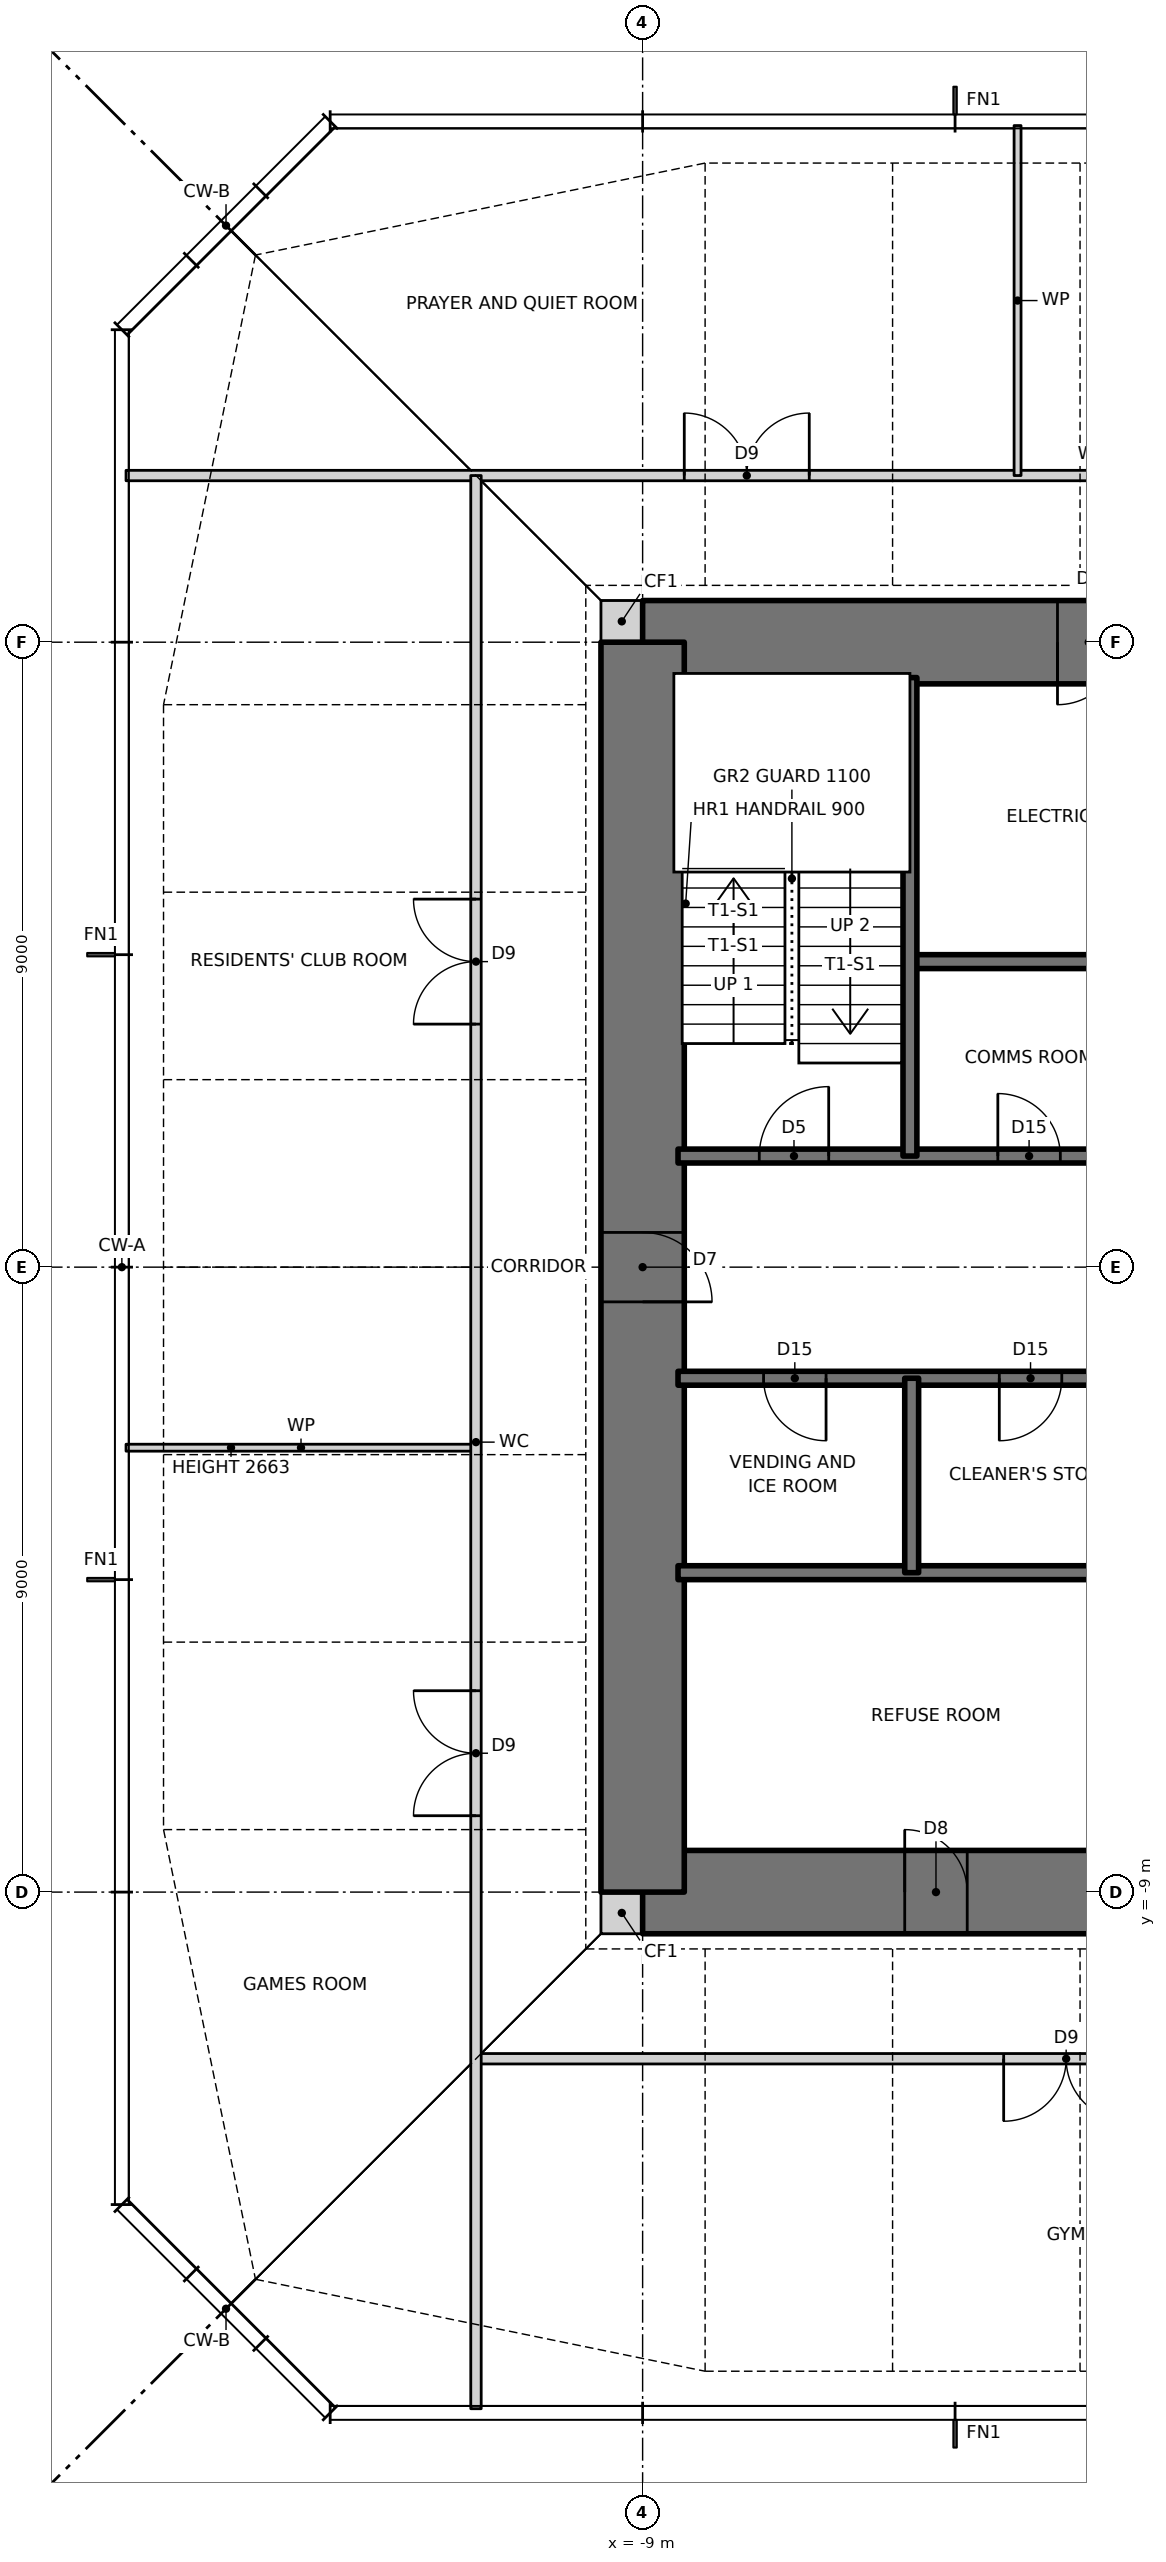
"""IFC4 building model, lengths in metres.
Left out: names, types, materials, properties, quantities, classifications, styles, units other than length and angle.
Written with IfcOpenShell. Run it as: python <this file> out.ifc"""

import sys

from ifc_helpers import new_model, si_unit, direction, frame, frame_2d, origin, place, context, subcontext, project, spatial, rectangle, extrude, element, fill, save


model = new_model("IFC4")
c1 = context("Model", 3, precision=1e-05, world=origin(), true_north=direction((0.0, 1.0)))
c2 = subcontext(c1, "Body", "Model", "MODEL_VIEW")
j1 = project(units=[si_unit("LENGTHUNIT", "METRE"), si_unit("PLANEANGLEUNIT", "RADIAN")], contexts=[c1])
p1 = place(None, origin())
s1 = spatial("IfcSite", under=j1, at=p1, CompositionType="ELEMENT")
p2 = place(p1, origin())
s2 = spatial("IfcBuilding", under=s1, at=p2, CompositionType="ELEMENT")
p3 = place(p2, frame((0.0, 0.0, 215.0)))
s3 = spatial("IfcBuildingStorey", under=s2, at=p3, CompositionType="ELEMENT", Elevation=215.0)
for number, where, z_axis, x_axis in (
    (1, (-9.6, -9.3, 0.0), (0.0, 0.0, 1.0), (1.0, 0.0, 0.0)),
    (2, (-9.6, 9.3, 0.0), (0.0, 0.0, 1.0), (1.0, 0.0, 0.0)),
):
    element("IfcWall", number, at=place(p3, frame(where, z_axis=z_axis, x_axis=x_axis)), inside=s3, PredefinedType="SOLIDWALL", context=c2, shape_type="SweptSolid", body=[
        extrude(rectangle(XDim=0.6, YDim=0.6, at=frame_2d((0.3, 0.0))), origin(), (0.0, 0.0, 1.0), 3.5),
    ])
p4 = place(p3, frame((-9.0, -9.0, 0.0), z_axis=(0.0, 0.0, 1.0), x_axis=(1.0, 0.0, 0.0)))
e3 = element("IfcWall", 3, at=p4, inside=s3, PredefinedType="SHEAR", context=c2, shape_type="SweptSolid", body=[
    extrude(rectangle(XDim=18.0, YDim=1.2, at=frame_2d((9.0, 0.0))), origin(), (0.0, 0.0, 1.0), 3.5),
])
p5 = place(p4, frame((3.775, 0.0, 0.0)))
e4 = element("IfcOpeningElement", 4, at=p5, cuts=e3, PredefinedType="OPENING", context=c2, shape_type="SweptSolid", body=[
    extrude(rectangle(XDim=0.9, YDim=2.1, at=frame_2d((0.45, 1.05))), frame((0.0, 0.61, 0.0), z_axis=(0.0, -1.0, 0.0), x_axis=(1.0, 0.0, 0.0)), (0.0, 0.0, 1.0), 1.22),
])
p6 = place(p4, frame((10.625, 0.0, 0.0)))
e5 = element("IfcOpeningElement", 5, at=p6, cuts=e3, PredefinedType="OPENING", context=c2, shape_type="SweptSolid", body=[
    extrude(rectangle(XDim=0.9, YDim=2.1, at=frame_2d((0.45, 1.05))), frame((0.0, 0.61, 0.0), z_axis=(0.0, -1.0, 0.0), x_axis=(1.0, 0.0, 0.0)), (0.0, 0.0, 1.0), 1.22),
])
p7 = place(p3, frame((9.0, 9.0, 0.0), z_axis=(0.0, 0.0, 1.0), x_axis=(-1.0, 0.0, 0.0)))
e6 = element("IfcWall", 6, at=p7, inside=s3, PredefinedType="SHEAR", context=c2, shape_type="SweptSolid", body=[
    extrude(rectangle(XDim=18.0, YDim=1.2, at=frame_2d((9.0, 0.0))), origin(), (0.0, 0.0, 1.0), 3.5),
])
p8 = place(p7, frame((11.125, 0.0, 0.0)))
e7 = element("IfcOpeningElement", 7, at=p8, cuts=e6, PredefinedType="OPENING", context=c2, shape_type="SweptSolid", body=[
    extrude(rectangle(XDim=0.9, YDim=2.1, at=frame_2d((0.45, 1.05))), frame((0.0, 0.61, 0.0), z_axis=(0.0, -1.0, 0.0), x_axis=(1.0, 0.0, 0.0)), (0.0, 0.0, 1.0), 1.22),
])
p9 = place(p7, frame((4.275, 0.0, 0.0)))
e8 = element("IfcOpeningElement", 8, at=p9, cuts=e6, PredefinedType="OPENING", context=c2, shape_type="SweptSolid", body=[
    extrude(rectangle(XDim=0.9, YDim=2.1, at=frame_2d((0.45, 1.05))), frame((0.0, 0.61, 0.0), z_axis=(0.0, -1.0, 0.0), x_axis=(1.0, 0.0, 0.0)), (0.0, 0.0, 1.0), 1.22),
])
p10 = place(p3, frame((-9.0, 9.0, 0.0), z_axis=(0.0, 0.0, 1.0), x_axis=(0.0, -1.0, 0.0)))
e9 = element("IfcWall", 9, at=p10, inside=s3, PredefinedType="SHEAR", context=c2, shape_type="SweptSolid", body=[
    extrude(rectangle(XDim=18.0, YDim=1.2, at=frame_2d((9.0, 0.0))), origin(), (0.0, 0.0, 1.0), 3.5),
])
p11 = place(p10, frame((8.5, 0.0, 0.0)))
e10 = element("IfcOpeningElement", 10, at=p11, cuts=e9, PredefinedType="OPENING", context=c2, shape_type="SweptSolid", body=[
    extrude(rectangle(XDim=1.0, YDim=2.1, at=frame_2d((0.5, 1.05))), frame((0.0, 0.61, 0.0), z_axis=(0.0, -1.0, 0.0), x_axis=(1.0, 0.0, 0.0)), (0.0, 0.0, 1.0), 1.22),
])
p12 = place(p3, frame((-11.4, -11.4, 0.0), z_axis=(0.0, 0.0, 1.0), x_axis=(1.0, 0.0, 0.0)))
e11 = element("IfcWall", 11, at=p12, inside=s3, PredefinedType="PARTITIONING", context=c2, shape_type="SweptSolid", body=[
    extrude(rectangle(XDim=27.84, YDim=0.15, at=frame_2d((13.92, 0.0))), origin(), (0.0, 0.0, 1.0), 3.27),
])
p13 = place(p12, frame((7.6, 0.0, 0.0)))
e12 = element("IfcOpeningElement", 12, at=p13, cuts=e11, PredefinedType="OPENING", context=c2, shape_type="SweptSolid", body=[
    extrude(rectangle(XDim=1.8, YDim=2.1, at=frame_2d((0.9, 1.05))), frame((0.0, 0.085, 0.0), z_axis=(0.0, -1.0, 0.0), x_axis=(1.0, 0.0, 0.0)), (0.0, 0.0, 1.0), 0.17),
])
p14 = place(p12, frame((19.0, 0.0, 0.0)))
e13 = element("IfcOpeningElement", 13, at=p14, cuts=e11, PredefinedType="OPENING", context=c2, shape_type="SweptSolid", body=[
    extrude(rectangle(XDim=1.8, YDim=2.1, at=frame_2d((0.9, 1.05))), frame((0.0, 0.085, 0.0), z_axis=(0.0, -1.0, 0.0), x_axis=(1.0, 0.0, 0.0)), (0.0, 0.0, 1.0), 0.17),
])
p15 = place(p3, frame((-8.49, -4.4, 0.0), z_axis=(0.0, 0.0, 1.0), x_axis=(1.0, 0.0, 0.0)))
e14 = element("IfcWall", 14, at=p15, inside=s3, PredefinedType="SOLIDWALL", context=c2, shape_type="SweptSolid", body=[
    extrude(rectangle(XDim=13.64, YDim=0.2, at=frame_2d((6.82, 0.0))), origin(), (0.0, 0.0, 1.0), 3.5),
])
p16 = place(p3, frame((-16.44, -2.6, 0.0), z_axis=(0.0, 0.0, 1.0), x_axis=(1.0, 0.0, 0.0)))
e15 = element("IfcWall", 15, at=p16, inside=s3, PredefinedType="PARTITIONING", context=c2, shape_type="SweptSolid", body=[
    extrude(rectangle(XDim=5.04, YDim=0.1, at=frame_2d((2.52, 0.0))), origin(), (0.0, 0.0, 1.0), 2.663),
])
p17 = place(p3, frame((-8.49, -1.6, 0.0), z_axis=(0.0, 0.0, 1.0), x_axis=(1.0, 0.0, 0.0)))
e16 = element("IfcWall", 16, at=p17, inside=s3, PredefinedType="SOLIDWALL", context=c2, shape_type="SweptSolid", body=[
    extrude(rectangle(XDim=16.98, YDim=0.2, at=frame_2d((8.49, 0.0))), origin(), (0.0, 0.0, 1.0), 3.5),
])
p18 = place(p17, frame((14.81, 0.0, 0.0)))
e17 = element("IfcOpeningElement", 17, at=p18, cuts=e16, PredefinedType="OPENING", context=c2, shape_type="SweptSolid", body=[
    extrude(rectangle(XDim=1.0, YDim=2.1, at=frame_2d((0.5, 1.05))), frame((0.0, 0.11, 0.0), z_axis=(0.0, -1.0, 0.0), x_axis=(1.0, 0.0, 0.0)), (0.0, 0.0, 1.0), 0.22),
])
p19 = place(p17, frame((1.232, 0.0, 0.0)))
e18 = element("IfcOpeningElement", 18, at=p19, cuts=e16, PredefinedType="OPENING", context=c2, shape_type="SweptSolid", body=[
    extrude(rectangle(XDim=0.9, YDim=2.1, at=frame_2d((0.45, 1.05))), frame((0.0, 0.11, 0.0), z_axis=(0.0, -1.0, 0.0), x_axis=(1.0, 0.0, 0.0)), (0.0, 0.0, 1.0), 0.22),
])
p20 = place(p17, frame((4.627, 0.0, 0.0)))
e19 = element("IfcOpeningElement", 19, at=p20, cuts=e16, PredefinedType="OPENING", context=c2, shape_type="SweptSolid", body=[
    extrude(rectangle(XDim=0.9, YDim=2.1, at=frame_2d((0.45, 1.05))), frame((0.0, 0.11, 0.0), z_axis=(0.0, -1.0, 0.0), x_axis=(1.0, 0.0, 0.0)), (0.0, 0.0, 1.0), 0.22),
])
p21 = place(p17, frame((8.052, 0.0, 0.0)))
e20 = element("IfcOpeningElement", 20, at=p21, cuts=e16, PredefinedType="OPENING", context=c2, shape_type="SweptSolid", body=[
    extrude(rectangle(XDim=0.9, YDim=2.1, at=frame_2d((0.45, 1.05))), frame((0.0, 0.11, 0.0), z_axis=(0.0, -1.0, 0.0), x_axis=(1.0, 0.0, 0.0)), (0.0, 0.0, 1.0), 0.22),
])
p22 = place(p17, frame((11.478, 0.0, 0.0)))
e21 = element("IfcOpeningElement", 21, at=p22, cuts=e16, PredefinedType="OPENING", context=c2, shape_type="SweptSolid", body=[
    extrude(rectangle(XDim=0.9, YDim=2.1, at=frame_2d((0.45, 1.05))), frame((0.0, 0.11, 0.0), z_axis=(0.0, -1.0, 0.0), x_axis=(1.0, 0.0, 0.0)), (0.0, 0.0, 1.0), 0.22),
])
p23 = place(p3, frame((-8.49, 1.6, 0.0), z_axis=(0.0, 0.0, 1.0), x_axis=(1.0, 0.0, 0.0)))
e22 = element("IfcWall", 22, at=p23, inside=s3, PredefinedType="SOLIDWALL", context=c2, shape_type="SweptSolid", body=[
    extrude(rectangle(XDim=16.98, YDim=0.2, at=frame_2d((8.49, 0.0))), origin(), (0.0, 0.0, 1.0), 3.5),
])
p24 = place(p23, frame((1.17, 0.0, 0.0)))
e23 = element("IfcOpeningElement", 23, at=p24, cuts=e22, PredefinedType="OPENING", context=c2, shape_type="SweptSolid", body=[
    extrude(rectangle(XDim=1.0, YDim=2.1, at=frame_2d((0.5, 1.05))), frame((0.0, 0.11, 0.0), z_axis=(0.0, -1.0, 0.0), x_axis=(1.0, 0.0, 0.0)), (0.0, 0.0, 1.0), 0.22),
])
p25 = place(p23, frame((4.606, 0.0, 0.0)))
e24 = element("IfcOpeningElement", 24, at=p25, cuts=e22, PredefinedType="OPENING", context=c2, shape_type="SweptSolid", body=[
    extrude(rectangle(XDim=0.9, YDim=2.1, at=frame_2d((0.45, 1.05))), frame((0.0, 0.11, 0.0), z_axis=(0.0, -1.0, 0.0), x_axis=(1.0, 0.0, 0.0)), (0.0, 0.0, 1.0), 0.22),
])
p26 = place(p23, frame((8.04, 0.0, 0.0)))
e25 = element("IfcOpeningElement", 25, at=p26, cuts=e22, PredefinedType="OPENING", context=c2, shape_type="SweptSolid", body=[
    extrude(rectangle(XDim=0.9, YDim=2.1, at=frame_2d((0.45, 1.05))), frame((0.0, 0.11, 0.0), z_axis=(0.0, -1.0, 0.0), x_axis=(1.0, 0.0, 0.0)), (0.0, 0.0, 1.0), 0.22),
])
p27 = place(p23, frame((11.374, 0.0, 0.0)))
e26 = element("IfcOpeningElement", 26, at=p27, cuts=e22, PredefinedType="OPENING", context=c2, shape_type="SweptSolid", body=[
    extrude(rectangle(XDim=1.1, YDim=2.1, at=frame_2d((0.55, 1.05))), frame((0.0, 0.11, 0.0), z_axis=(0.0, -1.0, 0.0), x_axis=(1.0, 0.0, 0.0)), (0.0, 0.0, 1.0), 0.22),
])
p28 = place(p23, frame((14.66, 0.0, 0.0)))
e27 = element("IfcOpeningElement", 27, at=p28, cuts=e22, PredefinedType="OPENING", context=c2, shape_type="SweptSolid", body=[
    extrude(rectangle(XDim=1.3, YDim=2.1, at=frame_2d((0.65, 1.05))), frame((0.0, 0.11, 0.0), z_axis=(0.0, -1.0, 0.0), x_axis=(1.0, 0.0, 0.0)), (0.0, 0.0, 1.0), 0.22),
])
p29 = place(p3, frame((-5.15, 4.4, 0.0), z_axis=(0.0, 0.0, 1.0), x_axis=(1.0, 0.0, 0.0)))
e28 = element("IfcWall", 28, at=p29, inside=s3, PredefinedType="SOLIDWALL", context=c2, shape_type="SweptSolid", body=[
    extrude(rectangle(XDim=10.3, YDim=0.2, at=frame_2d((5.15, 0.0))), origin(), (0.0, 0.0, 1.0), 3.5),
])
p30 = place(p3, frame((-16.44, 11.4, 0.0), z_axis=(0.0, 0.0, 1.0), x_axis=(1.0, 0.0, 0.0)))
e29 = element("IfcWall", 29, at=p30, inside=s3, PredefinedType="PARTITIONING", context=c2, shape_type="SweptSolid", body=[
    extrude(rectangle(XDim=27.84, YDim=0.15, at=frame_2d((13.92, 0.0))), origin(), (0.0, 0.0, 1.0), 3.27),
])
p31 = place(p30, frame((19.44, 0.0, 0.0)))
e30 = element("IfcOpeningElement", 30, at=p31, cuts=e29, PredefinedType="OPENING", context=c2, shape_type="SweptSolid", body=[
    extrude(rectangle(XDim=1.8, YDim=2.1, at=frame_2d((0.9, 1.05))), frame((0.0, 0.085, 0.0), z_axis=(0.0, -1.0, 0.0), x_axis=(1.0, 0.0, 0.0)), (0.0, 0.0, 1.0), 0.17),
])
p32 = place(p30, frame((8.04, 0.0, 0.0)))
e31 = element("IfcOpeningElement", 31, at=p32, cuts=e29, PredefinedType="OPENING", context=c2, shape_type="SweptSolid", body=[
    extrude(rectangle(XDim=1.8, YDim=2.1, at=frame_2d((0.9, 1.05))), frame((0.0, 0.085, 0.0), z_axis=(0.0, -1.0, 0.0), x_axis=(1.0, 0.0, 0.0)), (0.0, 0.0, 1.0), 0.17),
])
p33 = place(p3, frame((-3.6, 11.4, 0.0), z_axis=(0.0, 0.0, 1.0), x_axis=(0.0, 1.0, 0.0)))
e32 = element("IfcWall", 32, at=p33, inside=s3, PredefinedType="PARTITIONING", context=c2, shape_type="SweptSolid", body=[
    extrude(rectangle(XDim=5.04, YDim=0.1, at=frame_2d((2.52, 0.0))), origin(), (0.0, 0.0, 1.0), 3.27),
])
p34 = place(p3, frame((-5.125, -4.4, 0.0), z_axis=(0.0, 0.0, 1.0), x_axis=(0.0, 1.0, 0.0)))
e33 = element("IfcWall", 33, at=p34, inside=s3, PredefinedType="SOLIDWALL", context=c2, shape_type="SweptSolid", body=[
    extrude(rectangle(XDim=2.8, YDim=0.2, at=frame_2d((1.4, 0.0))), origin(), (0.0, 0.0, 1.0), 3.5),
])
p35 = place(p3, frame((-5.15, 1.6, 0.0), z_axis=(0.0, 0.0, 1.0), x_axis=(0.0, 1.0, 0.0)))
e34 = element("IfcWall", 34, at=p35, inside=s3, PredefinedType="SOLIDWALL", context=c2, shape_type="SweptSolid", body=[
    extrude(rectangle(XDim=6.89, YDim=0.2, at=frame_2d((3.445, 0.0))), origin(), (0.0, 0.0, 1.0), 3.5),
])
p36 = place(p3, frame((-11.4, -16.44, 0.0), z_axis=(0.0, 0.0, 1.0), x_axis=(0.0, 1.0, 0.0)))
e35 = element("IfcWall", 35, at=p36, inside=s3, PredefinedType="PARTITIONING", context=c2, shape_type="SweptSolid", body=[
    extrude(rectangle(XDim=27.84, YDim=0.15, at=frame_2d((13.92, 0.0))), origin(), (0.0, 0.0, 1.0), 3.27),
])
p37 = place(p36, frame((19.94, 0.0, 0.0)))
e36 = element("IfcOpeningElement", 36, at=p37, cuts=e35, PredefinedType="OPENING", context=c2, shape_type="SweptSolid", body=[
    extrude(rectangle(XDim=1.8, YDim=2.1, at=frame_2d((0.9, 1.05))), frame((0.0, 0.085, 0.0), z_axis=(0.0, -1.0, 0.0), x_axis=(1.0, 0.0, 0.0)), (0.0, 0.0, 1.0), 0.17),
])
p38 = place(p36, frame((8.54, 0.0, 0.0)))
e37 = element("IfcOpeningElement", 37, at=p38, cuts=e35, PredefinedType="OPENING", context=c2, shape_type="SweptSolid", body=[
    extrude(rectangle(XDim=1.8, YDim=2.1, at=frame_2d((0.9, 1.05))), frame((0.0, 0.085, 0.0), z_axis=(0.0, -1.0, 0.0), x_axis=(1.0, 0.0, 0.0)), (0.0, 0.0, 1.0), 0.17),
])
p39 = place(p24, origin())
e38 = element("IfcDoor", 38, at=p39, inside=s3, OperationType="SINGLE_SWING_RIGHT", PredefinedType="DOOR", context=c2, shape_type="SweptSolid", body=[
    extrude(rectangle(XDim=1.0, YDim=2.1, at=frame_2d((0.5, 1.05))), frame((0.0, 0.025, 0.0), z_axis=(0.0, -1.0, 0.0), x_axis=(1.0, 0.0, 0.0)), (0.0, 0.0, 1.0), 0.05),
])
fill(e23, e38)
p40 = place(p25, origin())
e39 = element("IfcDoor", 39, at=p40, inside=s3, OperationType="SINGLE_SWING_LEFT", PredefinedType="DOOR", context=c2, shape_type="SweptSolid", body=[
    extrude(rectangle(XDim=0.9, YDim=2.1, at=frame_2d((0.45, 1.05))), frame((0.0, 0.025, 0.0), z_axis=(0.0, -1.0, 0.0), x_axis=(1.0, 0.0, 0.0)), (0.0, 0.0, 1.0), 0.05),
])
fill(e24, e39)
p41 = place(p19, frame((0.9, 0.0, 0.0), z_axis=(0.0, 0.0, 1.0), x_axis=(-1.0, 0.0, 0.0)))
e40 = element("IfcDoor", 40, at=p41, inside=s3, OperationType="SINGLE_SWING_LEFT", PredefinedType="DOOR", context=c2, shape_type="SweptSolid", body=[
    extrude(rectangle(XDim=0.9, YDim=2.1, at=frame_2d((0.45, 1.05))), frame((0.0, 0.025, 0.0), z_axis=(0.0, -1.0, 0.0), x_axis=(1.0, 0.0, 0.0)), (0.0, 0.0, 1.0), 0.05),
])
fill(e18, e40)
p42 = place(p20, frame((0.9, 0.0, 0.0), z_axis=(0.0, 0.0, 1.0), x_axis=(-1.0, 0.0, 0.0)))
e41 = element("IfcDoor", 41, at=p42, inside=s3, OperationType="SINGLE_SWING_RIGHT", PredefinedType="DOOR", context=c2, shape_type="SweptSolid", body=[
    extrude(rectangle(XDim=0.9, YDim=2.1, at=frame_2d((0.45, 1.05))), frame((0.0, 0.025, 0.0), z_axis=(0.0, -1.0, 0.0), x_axis=(1.0, 0.0, 0.0)), (0.0, 0.0, 1.0), 0.05),
])
fill(e19, e41)
p43 = place(p13, frame((1.8, 0.0, 0.0), z_axis=(0.0, 0.0, 1.0), x_axis=(-1.0, 0.0, 0.0)))
e42 = element("IfcDoor", 42, at=p43, inside=s3, OperationType="DOUBLE_DOOR_SINGLE_SWING", PredefinedType="DOOR", context=c2, shape_type="SweptSolid", body=[
    extrude(rectangle(XDim=1.8, YDim=2.1, at=frame_2d((0.9, 1.05))), frame((0.0, 0.025, 0.0), z_axis=(0.0, -1.0, 0.0), x_axis=(1.0, 0.0, 0.0)), (0.0, 0.0, 1.0), 0.05),
])
fill(e12, e42)
p44 = place(p32, origin())
e43 = element("IfcDoor", 43, at=p44, inside=s3, OperationType="DOUBLE_DOOR_SINGLE_SWING", PredefinedType="DOOR", context=c2, shape_type="SweptSolid", body=[
    extrude(rectangle(XDim=1.8, YDim=2.1, at=frame_2d((0.9, 1.05))), frame((0.0, 0.025, 0.0), z_axis=(0.0, -1.0, 0.0), x_axis=(1.0, 0.0, 0.0)), (0.0, 0.0, 1.0), 0.05),
])
fill(e31, e43)
p45 = place(p37, origin())
e44 = element("IfcDoor", 44, at=p45, inside=s3, OperationType="DOUBLE_DOOR_SINGLE_SWING", PredefinedType="DOOR", context=c2, shape_type="SweptSolid", body=[
    extrude(rectangle(XDim=1.8, YDim=2.1, at=frame_2d((0.9, 1.05))), frame((0.0, 0.025, 0.0), z_axis=(0.0, -1.0, 0.0), x_axis=(1.0, 0.0, 0.0)), (0.0, 0.0, 1.0), 0.05),
])
fill(e36, e44)
p46 = place(p38, origin())
e45 = element("IfcDoor", 45, at=p46, inside=s3, OperationType="DOUBLE_DOOR_SINGLE_SWING", PredefinedType="DOOR", context=c2, shape_type="SweptSolid", body=[
    extrude(rectangle(XDim=1.8, YDim=2.1, at=frame_2d((0.9, 1.05))), frame((0.0, 0.025, 0.0), z_axis=(0.0, -1.0, 0.0), x_axis=(1.0, 0.0, 0.0)), (0.0, 0.0, 1.0), 0.05),
])
fill(e37, e45)
p47 = place(p11, origin())
e46 = element("IfcDoor", 46, at=p47, inside=s3, OperationType="SINGLE_SWING_RIGHT", PredefinedType="DOOR", context=c2, shape_type="SweptSolid", body=[
    extrude(rectangle(XDim=1.0, YDim=2.1, at=frame_2d((0.5, 1.05))), frame((0.0, 0.025, 0.0), z_axis=(0.0, -1.0, 0.0), x_axis=(1.0, 0.0, 0.0)), (0.0, 0.0, 1.0), 0.05),
])
fill(e10, e46)
p48 = place(p8, origin())
e47 = element("IfcDoor", 47, at=p48, inside=s3, OperationType="SINGLE_SWING_RIGHT", PredefinedType="DOOR", context=c2, shape_type="SweptSolid", body=[
    extrude(rectangle(XDim=0.9, YDim=2.1, at=frame_2d((0.45, 1.05))), frame((0.0, 0.025, 0.0), z_axis=(0.0, -1.0, 0.0), x_axis=(1.0, 0.0, 0.0)), (0.0, 0.0, 1.0), 0.05),
])
fill(e7, e47)
p49 = place(p5, origin())
e48 = element("IfcDoor", 48, at=p49, inside=s3, OperationType="SINGLE_SWING_LEFT", PredefinedType="DOOR", context=c2, shape_type="SweptSolid", body=[
    extrude(rectangle(XDim=0.9, YDim=2.1, at=frame_2d((0.45, 1.05))), frame((0.0, 0.025, 0.0), z_axis=(0.0, -1.0, 0.0), x_axis=(1.0, 0.0, 0.0)), (0.0, 0.0, 1.0), 0.05),
])
fill(e4, e48)
save(model, sys.argv[1])
